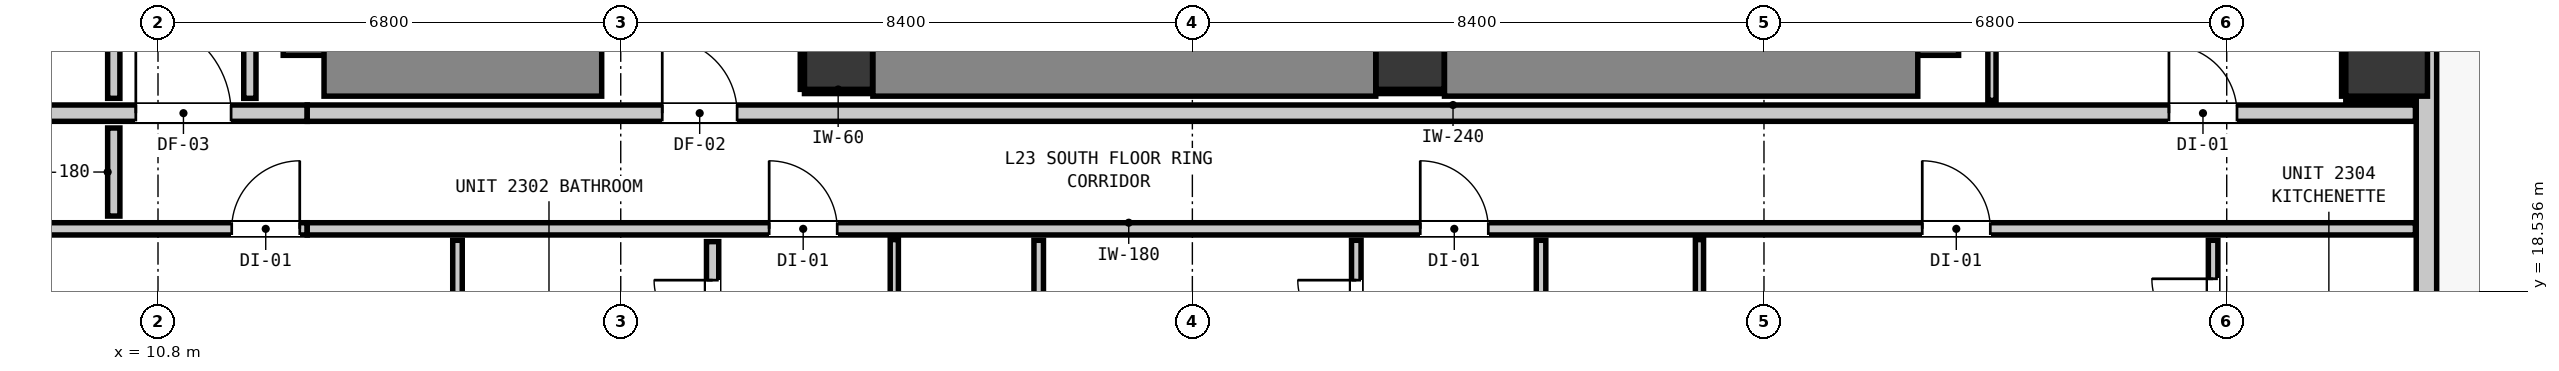
"""IFC4 building model, lengths in metres.
Left out: names, types, materials, properties, quantities, classifications, styles, units other than length and angle.
Written with IfcOpenShell. Run it as: python <this file> out.ifc"""

import sys

from ifc_helpers import new_model, si_unit, direction, frame, frame_2d, origin, origin_2d, place, context, subcontext, project, spatial, rectangle, extrude, element, fill, save


model = new_model("IFC4")
c1 = context("Model", 3, precision=1e-05, world=origin(), true_north=direction((0.0, 1.0)))
c2 = subcontext(c1, "Body", "Model", "MODEL_VIEW")
j1 = project(units=[si_unit("LENGTHUNIT", "METRE"), si_unit("PLANEANGLEUNIT", "RADIAN")], contexts=[c1])
p1 = place(None, origin())
s1 = spatial("IfcSite", under=j1, at=p1, CompositionType="ELEMENT")
p2 = place(p1, origin())
s2 = spatial("IfcBuilding", under=s1, at=p2, CompositionType="ELEMENT")
p3 = place(p2, frame((0.0, 0.0, 81.76)))
s3 = spatial("IfcBuildingStorey", under=s2, at=p3, CompositionType="ELEMENT", Elevation=81.76)
for number, where, z_axis, x_axis in (
    (1, (20.8, 22.0, 0.0), (0.0, 0.0, 1.0), (1.0, 0.0, 0.0)),
    (2, (29.2, 22.0, 0.0), (0.0, 0.0, 1.0), (1.0, 0.0, 0.0)),
):
    element("IfcColumn", number, at=place(p3, frame(where, z_axis=z_axis, x_axis=x_axis)), inside=s3, PredefinedType="COLUMN", context=c2, shape_type="SweptSolid", body=[
        extrude(rectangle(XDim=1.0, YDim=1.0, at=origin_2d()), origin(), (0.0, 0.0, 1.0), 3.32),
    ])
p4 = place(p3, frame((13.24, 22.0, 0.0), z_axis=(0.0, 0.0, 1.0), x_axis=(0.0, 1.0, 0.0)))
e3 = element("IfcWall", 3, at=p4, inside=s3, PredefinedType="SHEAR", context=c2, shape_type="SweptSolid", body=[
    extrude(rectangle(XDim=8.195, YDim=1.2, at=frame_2d((4.098, 0.0))), origin(), (0.0, 0.0, 1.0), 3.32),
])
p5 = place(p3, frame((13.24, 22.0, 0.0), z_axis=(0.0, 0.0, 1.0), x_axis=(1.0, 0.0, 0.0)))
e4 = element("IfcWall", 4, at=p5, inside=s3, PredefinedType="SHEAR", context=c2, shape_type="SweptSolid", body=[
    extrude(rectangle(XDim=4.08, YDim=1.2, at=frame_2d((2.04, 0.0))), origin(), (0.0, 0.0, 1.0), 3.32),
])
p6 = place(p3, frame((36.66, 22.0, 0.0), z_axis=(0.0, 0.0, 1.0), x_axis=(0.0, 1.0, 0.0)))
e5 = element("IfcWall", 5, at=p6, inside=s3, PredefinedType="SHEAR", context=c2, shape_type="SweptSolid", body=[
    extrude(rectangle(XDim=8.195, YDim=1.2, at=frame_2d((4.098, 0.0))), origin(), (0.0, 0.0, 1.0), 3.32),
])
p7 = place(p3, frame((29.705, 22.0, 0.0), z_axis=(0.0, 0.0, 1.0), x_axis=(1.0, 0.0, 0.0)))
e6 = element("IfcWall", 6, at=p7, inside=s3, PredefinedType="SHEAR", context=c2, shape_type="SweptSolid", body=[
    extrude(rectangle(XDim=6.955, YDim=1.2, at=frame_2d((3.478, 0.0))), origin(), (0.0, 0.0, 1.0), 3.32),
])
p8 = place(p3, frame((21.305, 22.0, 0.0), z_axis=(0.0, 0.0, 1.0), x_axis=(1.0, 0.0, 0.0)))
e7 = element("IfcWall", 7, at=p8, inside=s3, PredefinedType="SHEAR", context=c2, shape_type="SweptSolid", body=[
    extrude(rectangle(XDim=7.39, YDim=1.2, at=frame_2d((3.695, 0.0))), origin(), (0.0, 0.0, 1.0), 3.32),
])
p9 = place(p3, frame((43.55, 22.0, -0.2), z_axis=(0.0, 0.0, 1.0), x_axis=(1.0, 0.0, 0.0)))
e8 = element("IfcColumn", 8, at=p9, inside=s3, PredefinedType="COLUMN", context=c2, shape_type="SweptSolid", body=[
    extrude(rectangle(XDim=1.2, YDim=1.2, at=origin_2d()), origin(), (0.0, 0.0, 1.0), 3.52),
])
p10 = place(p3, frame((44.135, 51.035, 0.0), z_axis=(0.0, 0.0, 1.0), x_axis=(0.0, -1.0, 0.0)))
e9 = element("IfcWall", 9, at=p10, inside=s3, PredefinedType="STANDARD", context=c2, shape_type="SweptSolid", body=[
    extrude(rectangle(XDim=34.67, YDim=0.3, at=frame_2d((17.335, 0.0))), origin(), (0.0, 0.0, 1.0), 3.06),
])
p11 = place(p10, frame((0.501, 0.0, 0.0)))
e10 = element("IfcOpeningElement", 10, at=p11, cuts=e9, PredefinedType="OPENING", context=c2, shape_type="SweptSolid", body=[
    extrude(rectangle(XDim=1.1, YDim=2.15, at=frame_2d((0.55, 1.075))), frame((0.0, 0.16, 0.0), z_axis=(0.0, -1.0, 0.0), x_axis=(1.0, 0.0, 0.0)), (0.0, 0.0, 1.0), 0.32),
])
p12 = place(p10, frame((1.978, 0.0, 0.85)))
e11 = element("IfcOpeningElement", 11, at=p12, cuts=e9, PredefinedType="OPENING", context=c2, shape_type="SweptSolid", body=[
    extrude(rectangle(XDim=0.58, YDim=1.5, at=frame_2d((0.29, 0.75))), frame((0.0, 0.16, 0.0), z_axis=(0.0, -1.0, 0.0), x_axis=(1.0, 0.0, 0.0)), (0.0, 0.0, 1.0), 0.32),
])
p13 = place(p10, frame((26.335, 0.0, 0.85)))
e12 = element("IfcOpeningElement", 12, at=p13, cuts=e9, PredefinedType="OPENING", context=c2, shape_type="SweptSolid", body=[
    extrude(rectangle(XDim=1.2, YDim=1.8, at=frame_2d((0.6, 0.9))), frame((0.0, 0.16, 0.0), z_axis=(0.0, -1.0, 0.0), x_axis=(1.0, 0.0, 0.0)), (0.0, 0.0, 1.0), 0.32),
])
p14 = place(p10, frame((13.551, 0.0, 0.85)))
e13 = element("IfcOpeningElement", 13, at=p14, cuts=e9, PredefinedType="OPENING", context=c2, shape_type="SweptSolid", body=[
    extrude(rectangle(XDim=1.2, YDim=1.8, at=frame_2d((0.6, 0.9))), frame((0.0, 0.16, 0.0), z_axis=(0.0, -1.0, 0.0), x_axis=(1.0, 0.0, 0.0)), (0.0, 0.0, 1.0), 0.32),
])
p15 = place(p3, frame((2.657, 21.15, 0.0), z_axis=(0.0, 0.0, 1.0), x_axis=(1.0, 0.0, 0.0)))
e14 = element("IfcWall", 14, at=p15, inside=s3, PredefinedType="PARTITIONING", context=c2, shape_type="SweptSolid", body=[
    extrude(rectangle(XDim=10.336, YDim=0.24, at=frame_2d((5.168, 0.0))), origin(), (0.0, 0.0, 1.0), 2.445),
])
p16 = place(p15, frame((7.817, 0.0, 0.0)))
e15 = element("IfcOpeningElement", 15, at=p16, cuts=e14, PredefinedType="OPENING", context=c2, shape_type="SweptSolid", body=[
    extrude(rectangle(XDim=1.4, YDim=2.15, at=frame_2d((0.7, 1.075))), frame((0.0, 0.13, 0.0), z_axis=(0.0, -1.0, 0.0), x_axis=(1.0, 0.0, 0.0)), (0.0, 0.0, 1.0), 0.26),
])
p17 = place(p3, frame((12.993, 21.15, 0.0), z_axis=(0.0, 0.0, 1.0), x_axis=(1.0, 0.0, 0.0)))
e16 = element("IfcWall", 16, at=p17, inside=s3, PredefinedType="PARTITIONING", context=c2, shape_type="SweptSolid", body=[
    extrude(rectangle(XDim=30.98, YDim=0.24, at=frame_2d((15.49, 0.0))), origin(), (0.0, 0.0, 1.0), 3.06),
])
p18 = place(p17, frame((5.217, 0.0, 0.0)))
e17 = element("IfcOpeningElement", 17, at=p18, cuts=e16, PredefinedType="OPENING", context=c2, shape_type="SweptSolid", body=[
    extrude(rectangle(XDim=1.1, YDim=2.15, at=frame_2d((0.55, 1.075))), frame((0.0, 0.13, 0.0), z_axis=(0.0, -1.0, 0.0), x_axis=(1.0, 0.0, 0.0)), (0.0, 0.0, 1.0), 0.26),
])
p19 = place(p17, frame((27.358, 0.0, 0.0)))
e18 = element("IfcOpeningElement", 18, at=p19, cuts=e16, PredefinedType="OPENING", context=c2, shape_type="SweptSolid", body=[
    extrude(rectangle(XDim=1.0, YDim=2.15, at=frame_2d((0.5, 1.075))), frame((0.0, 0.13, 0.0), z_axis=(0.0, -1.0, 0.0), x_axis=(1.0, 0.0, 0.0)), (0.0, 0.0, 1.0), 0.26),
])
p20 = place(p3, frame((2.657, 19.45, 0.0), z_axis=(0.0, 0.0, 1.0), x_axis=(1.0, 0.0, 0.0)))
e19 = element("IfcWall", 19, at=p20, inside=s3, PredefinedType="PARTITIONING", context=c2, shape_type="SweptSolid", body=[
    extrude(rectangle(XDim=10.336, YDim=0.18, at=frame_2d((5.168, 0.0))), origin(), (0.0, 0.0, 1.0), 2.445),
])
p21 = place(p20, frame((9.226, 0.0, 0.0)))
e20 = element("IfcOpeningElement", 20, at=p21, cuts=e19, PredefinedType="OPENING", context=c2, shape_type="SweptSolid", body=[
    extrude(rectangle(XDim=1.0, YDim=2.15, at=frame_2d((0.5, 1.075))), frame((0.0, 0.1, 0.0), z_axis=(0.0, -1.0, 0.0), x_axis=(1.0, 0.0, 0.0)), (0.0, 0.0, 1.0), 0.2),
])
p22 = place(p3, frame((12.993, 19.45, 0.0), z_axis=(0.0, 0.0, 1.0), x_axis=(1.0, 0.0, 0.0)))
e21 = element("IfcWall", 21, at=p22, inside=s3, PredefinedType="PARTITIONING", context=c2, shape_type="SweptSolid", body=[
    extrude(rectangle(XDim=30.98, YDim=0.18, at=frame_2d((15.49, 0.0))), origin(), (0.0, 0.0, 1.0), 3.06),
])
p23 = place(p22, frame((6.788, 0.0, 0.0)))
e22 = element("IfcOpeningElement", 22, at=p23, cuts=e21, PredefinedType="OPENING", context=c2, shape_type="SweptSolid", body=[
    extrude(rectangle(XDim=1.0, YDim=2.15, at=frame_2d((0.5, 1.075))), frame((0.0, 0.1, 0.0), z_axis=(0.0, -1.0, 0.0), x_axis=(1.0, 0.0, 0.0)), (0.0, 0.0, 1.0), 0.2),
])
p24 = place(p22, frame((16.356, 0.0, 0.0)))
e23 = element("IfcOpeningElement", 23, at=p24, cuts=e21, PredefinedType="OPENING", context=c2, shape_type="SweptSolid", body=[
    extrude(rectangle(XDim=1.0, YDim=2.15, at=frame_2d((0.5, 1.075))), frame((0.0, 0.1, 0.0), z_axis=(0.0, -1.0, 0.0), x_axis=(1.0, 0.0, 0.0)), (0.0, 0.0, 1.0), 0.2),
])
p25 = place(p22, frame((23.733, 0.0, 0.0)))
e24 = element("IfcOpeningElement", 24, at=p25, cuts=e21, PredefinedType="OPENING", context=c2, shape_type="SweptSolid", body=[
    extrude(rectangle(XDim=1.0, YDim=2.15, at=frame_2d((0.5, 1.075))), frame((0.0, 0.1, 0.0), z_axis=(0.0, -1.0, 0.0), x_axis=(1.0, 0.0, 0.0)), (0.0, 0.0, 1.0), 0.2),
])
p26 = place(p3, frame((10.15, 19.638, 0.0), z_axis=(0.0, 0.0, 1.0), x_axis=(0.0, 1.0, 0.0)))
e25 = element("IfcWall", 25, at=p26, inside=s3, PredefinedType="PARTITIONING", context=c2, shape_type="SweptSolid", body=[
    extrude(rectangle(XDim=1.294, YDim=0.18, at=frame_2d((0.647, 0.0))), origin(), (0.0, 0.0, 1.0), 3.06),
])
p27 = place(p3, frame((10.15, 21.368, 0.0), z_axis=(0.0, 0.0, 1.0), x_axis=(0.0, 1.0, 0.0)))
e26 = element("IfcWall", 26, at=p27, inside=s3, PredefinedType="PARTITIONING", context=c2, shape_type="SweptSolid", body=[
    extrude(rectangle(XDim=2.074, YDim=0.18, at=frame_2d((1.037, 0.0))), origin(), (0.0, 0.0, 1.0), 3.06),
])
p28 = place(p3, frame((12.15, 21.368, 0.0), z_axis=(0.0, 0.0, 1.0), x_axis=(0.0, 1.0, 0.0)))
e27 = element("IfcWall", 27, at=p28, inside=s3, PredefinedType="PARTITIONING", context=c2, shape_type="SweptSolid", body=[
    extrude(rectangle(XDim=18.694, YDim=0.18, at=frame_2d((9.347, 0.0))), origin(), (0.0, 0.0, 1.0), 3.06),
])
p29 = place(p3, frame((18.95, 17.275, 0.0), z_axis=(0.0, 0.0, 1.0), x_axis=(0.0, 1.0, 0.0)))
e28 = element("IfcWall", 28, at=p29, inside=s3, PredefinedType="PARTITIONING", context=c2, shape_type="SweptSolid", body=[
    extrude(rectangle(XDim=1.987, YDim=0.18, at=frame_2d((0.994, 0.0))), origin(), (0.0, 0.0, 1.0), 3.06),
])
p30 = place(p29, frame((0.561, 0.0, 0.0)))
e29 = element("IfcOpeningElement", 29, at=p30, cuts=e28, PredefinedType="OPENING", context=c2, shape_type="SweptSolid", body=[
    extrude(rectangle(XDim=0.86, YDim=2.02, at=frame_2d((0.43, 1.01))), frame((0.0, 0.1, 0.0), z_axis=(0.0, -1.0, 0.0), x_axis=(1.0, 0.0, 0.0)), (0.0, 0.0, 1.0), 0.2),
])
for number, where, z_axis, x_axis in (
    (30, (15.201, 17.255, 0.0), (0.0, 0.0, 1.0), (0.0, 1.0, 0.0)),
    (31, (23.742, 17.255, 0.0), (0.0, 0.0, 1.0), (0.0, 1.0, 0.0)),
):
    element("IfcWall", number, at=place(p3, frame(where, z_axis=z_axis, x_axis=x_axis)), inside=s3, PredefinedType="PARTITIONING", context=c2, shape_type="SweptSolid", body=[
        extrude(rectangle(XDim=2.027, YDim=0.14, at=frame_2d((1.014, 0.0))), origin(), (0.0, 0.0, 1.0), 3.06),
    ])
p31 = place(p3, frame((28.409, 17.255, 0.0), z_axis=(0.0, 0.0, 1.0), x_axis=(0.0, 1.0, 0.0)))
e32 = element("IfcWall", 32, at=p31, inside=s3, PredefinedType="PARTITIONING", context=c2, shape_type="SweptSolid", body=[
    extrude(rectangle(XDim=2.027, YDim=0.14, at=frame_2d((1.014, 0.0))), origin(), (0.0, 0.0, 1.0), 3.06),
])
p32 = place(p31, frame((0.581, 0.0, 0.0)))
e33 = element("IfcOpeningElement", 33, at=p32, cuts=e32, PredefinedType="OPENING", context=c2, shape_type="SweptSolid", body=[
    extrude(rectangle(XDim=0.86, YDim=2.02, at=frame_2d((0.43, 1.01))), frame((0.0, 0.08, 0.0), z_axis=(0.0, -1.0, 0.0), x_axis=(1.0, 0.0, 0.0)), (0.0, 0.0, 1.0), 0.16),
])
p33 = place(p3, frame((31.124, 14.027, 0.0), z_axis=(0.0, 0.0, 1.0), x_axis=(0.0, 1.0, 0.0)))
e34 = element("IfcWall", 34, at=p33, inside=s3, PredefinedType="PARTITIONING", context=c2, shape_type="SweptSolid", body=[
    extrude(rectangle(XDim=5.255, YDim=0.14, at=frame_2d((2.627, 0.0))), origin(), (0.0, 0.0, 1.0), 3.06),
])
p34 = place(p33, frame((2.248, 0.0, 0.0)))
e35 = element("IfcOpeningElement", 35, at=p34, cuts=e34, PredefinedType="OPENING", context=c2, shape_type="SweptSolid", body=[
    extrude(rectangle(XDim=0.9, YDim=2.1, at=frame_2d((0.45, 1.05))), frame((0.0, 0.08, 0.0), z_axis=(0.0, -1.0, 0.0), x_axis=(1.0, 0.0, 0.0)), (0.0, 0.0, 1.0), 0.16),
])
p35 = place(p3, frame((41.0, 17.255, 0.0), z_axis=(0.0, 0.0, 1.0), x_axis=(0.0, 1.0, 0.0)))
e36 = element("IfcWall", 36, at=p35, inside=s3, PredefinedType="PARTITIONING", context=c2, shape_type="SweptSolid", body=[
    extrude(rectangle(XDim=2.027, YDim=0.14, at=frame_2d((1.014, 0.0))), origin(), (0.0, 0.0, 1.0), 3.06),
])
p36 = place(p35, frame((0.561, 0.0, 0.0)))
e37 = element("IfcOpeningElement", 37, at=p36, cuts=e36, PredefinedType="OPENING", context=c2, shape_type="SweptSolid", body=[
    extrude(rectangle(XDim=0.9, YDim=2.1, at=frame_2d((0.45, 1.05))), frame((0.0, 0.08, 0.0), z_axis=(0.0, -1.0, 0.0), x_axis=(1.0, 0.0, 0.0)), (0.0, 0.0, 1.0), 0.16),
])
p37 = place(p3, frame((21.62, 14.027, 0.0), z_axis=(0.0, 0.0, 1.0), x_axis=(0.0, 1.0, 0.0)))
e38 = element("IfcWall", 38, at=p37, inside=s3, PredefinedType="PARTITIONING", context=c2, shape_type="SweptSolid", body=[
    extrude(rectangle(XDim=5.265, YDim=0.12, at=frame_2d((2.632, 0.0))), origin(), (0.0, 0.0, 1.0), 3.06),
])
p38 = place(p37, frame((2.248, 0.0, 0.0)))
e39 = element("IfcOpeningElement", 39, at=p38, cuts=e38, PredefinedType="OPENING", context=c2, shape_type="SweptSolid", body=[
    extrude(rectangle(XDim=0.9, YDim=2.1, at=frame_2d((0.45, 1.05))), frame((0.0, 0.07, 0.0), z_axis=(0.0, -1.0, 0.0), x_axis=(1.0, 0.0, 0.0)), (0.0, 0.0, 1.0), 0.14),
])
p39 = place(p3, frame((33.452, 14.027, 0.0), z_axis=(0.0, 0.0, 1.0), x_axis=(0.0, 1.0, 0.0)))
e40 = element("IfcWall", 40, at=p39, inside=s3, PredefinedType="PARTITIONING", context=c2, shape_type="SweptSolid", body=[
    extrude(rectangle(XDim=5.265, YDim=0.12, at=frame_2d((2.632, 0.0))), origin(), (0.0, 0.0, 1.0), 3.06),
])
p40 = place(p3, frame((37.75, 21.338, 0.0), z_axis=(0.0, 0.0, 1.0), x_axis=(0.0, 1.0, 0.0)))
e41 = element("IfcWall", 41, at=p40, inside=s3, PredefinedType="PARTITIONING", context=c2, shape_type="SweptSolid", body=[
    extrude(rectangle(XDim=4.024, YDim=0.12, at=frame_2d((2.012, 0.0))), origin(), (0.0, 0.0, 1.0), 3.06),
])
p41 = place(p3, frame((20.3, 21.468, 0.0), z_axis=(0.0, 0.0, 1.0), x_axis=(1.0, 0.0, 0.0)))
e42 = element("IfcWall", 42, at=p41, inside=s3, PredefinedType="PARTITIONING", context=c2, shape_type="SweptSolid", body=[
    extrude(rectangle(XDim=0.99, YDim=0.06, at=frame_2d((0.495, 0.0))), origin(), (0.0, 0.0, 1.0), 1.45),
])
p42 = place(p3, frame((20.268, 21.5, 0.0), z_axis=(0.0, 0.0, 1.0), x_axis=(0.0, 1.0, 0.0)))
e43 = element("IfcWall", 43, at=p42, inside=s3, PredefinedType="PARTITIONING", context=c2, shape_type="SweptSolid", body=[
    extrude(rectangle(XDim=1.0, YDim=0.06, at=frame_2d((0.5, 0.0))), origin(), (0.0, 0.0, 1.0), 1.45),
])
p43 = place(p3, frame((28.71, 21.468, 0.0), z_axis=(0.0, 0.0, 1.0), x_axis=(1.0, 0.0, 0.0)))
e44 = element("IfcWall", 44, at=p43, inside=s3, PredefinedType="PARTITIONING", context=c2, shape_type="SweptSolid", body=[
    extrude(rectangle(XDim=0.98, YDim=0.06, at=frame_2d((0.49, 0.0))), origin(), (0.0, 0.0, 1.0), 1.45),
])
p44 = place(p3, frame((42.95, 21.368, 0.0), z_axis=(0.0, 0.0, 1.0), x_axis=(1.0, 0.0, 0.0)))
e45 = element("IfcWall", 45, at=p44, inside=s3, PredefinedType="PARTITIONING", context=c2, shape_type="SweptSolid", body=[
    extrude(rectangle(XDim=1.02, YDim=0.06, at=frame_2d((0.51, 0.0))), origin(), (0.0, 0.0, 1.0), 1.45),
])
p45 = place(p3, frame((42.918, 21.4, 0.0), z_axis=(0.0, 0.0, 1.0), x_axis=(0.0, 1.0, 0.0)))
e46 = element("IfcWall", 46, at=p45, inside=s3, PredefinedType="PARTITIONING", context=c2, shape_type="SweptSolid", body=[
    extrude(rectangle(XDim=1.2, YDim=0.06, at=frame_2d((0.6, 0.0))), origin(), (0.0, 0.0, 1.0), 1.45),
])
p46 = place(p18, origin())
e47 = element("IfcDoor", 47, at=p46, inside=s3, OperationType="SINGLE_SWING_LEFT", PredefinedType="DOOR", context=c2, shape_type="SweptSolid", body=[
    extrude(rectangle(XDim=1.1, YDim=2.15, at=frame_2d((0.55, 1.075))), frame((0.0, 0.025, 0.0), z_axis=(0.0, -1.0, 0.0), x_axis=(1.0, 0.0, 0.0)), (0.0, 0.0, 1.0), 0.05),
])
fill(e17, e47)
p47 = place(p16, origin())
e48 = element("IfcDoor", 48, at=p47, inside=s3, OperationType="SINGLE_SWING_LEFT", PredefinedType="DOOR", context=c2, shape_type="SweptSolid", body=[
    extrude(rectangle(XDim=1.4, YDim=2.15, at=frame_2d((0.7, 1.075))), frame((0.0, 0.025, 0.0), z_axis=(0.0, -1.0, 0.0), x_axis=(1.0, 0.0, 0.0)), (0.0, 0.0, 1.0), 0.05),
])
fill(e15, e48)
p48 = place(p21, origin())
e49 = element("IfcDoor", 49, at=p48, inside=s3, OperationType="SINGLE_SWING_RIGHT", PredefinedType="DOOR", context=c2, shape_type="SweptSolid", body=[
    extrude(rectangle(XDim=1.0, YDim=2.15, at=frame_2d((0.5, 1.075))), frame((0.0, 0.025, 0.0), z_axis=(0.0, -1.0, 0.0), x_axis=(1.0, 0.0, 0.0)), (0.0, 0.0, 1.0), 0.05),
])
fill(e20, e49)
p49 = place(p23, origin())
e50 = element("IfcDoor", 50, at=p49, inside=s3, OperationType="SINGLE_SWING_LEFT", PredefinedType="DOOR", context=c2, shape_type="SweptSolid", body=[
    extrude(rectangle(XDim=1.0, YDim=2.15, at=frame_2d((0.5, 1.075))), frame((0.0, 0.025, 0.0), z_axis=(0.0, -1.0, 0.0), x_axis=(1.0, 0.0, 0.0)), (0.0, 0.0, 1.0), 0.05),
])
fill(e22, e50)
p50 = place(p30, origin())
e51 = element("IfcDoor", 51, at=p50, inside=s3, OperationType="SINGLE_SWING_RIGHT", PredefinedType="DOOR", context=c2, shape_type="SweptSolid", body=[
    extrude(rectangle(XDim=0.86, YDim=2.02, at=frame_2d((0.43, 1.01))), frame((0.0, 0.025, 0.0), z_axis=(0.0, -1.0, 0.0), x_axis=(1.0, 0.0, 0.0)), (0.0, 0.0, 1.0), 0.05),
])
fill(e29, e51)
p51 = place(p24, origin())
e52 = element("IfcDoor", 52, at=p51, inside=s3, OperationType="SINGLE_SWING_LEFT", PredefinedType="DOOR", context=c2, shape_type="SweptSolid", body=[
    extrude(rectangle(XDim=1.0, YDim=2.15, at=frame_2d((0.5, 1.075))), frame((0.0, 0.025, 0.0), z_axis=(0.0, -1.0, 0.0), x_axis=(1.0, 0.0, 0.0)), (0.0, 0.0, 1.0), 0.05),
])
fill(e23, e52)
p52 = place(p32, origin())
e53 = element("IfcDoor", 53, at=p52, inside=s3, OperationType="SINGLE_SWING_RIGHT", PredefinedType="DOOR", context=c2, shape_type="SweptSolid", body=[
    extrude(rectangle(XDim=0.86, YDim=2.02, at=frame_2d((0.43, 1.01))), frame((0.0, 0.025, 0.0), z_axis=(0.0, -1.0, 0.0), x_axis=(1.0, 0.0, 0.0)), (0.0, 0.0, 1.0), 0.05),
])
fill(e33, e53)
p53 = place(p25, origin())
e54 = element("IfcDoor", 54, at=p53, inside=s3, OperationType="SINGLE_SWING_LEFT", PredefinedType="DOOR", context=c2, shape_type="SweptSolid", body=[
    extrude(rectangle(XDim=1.0, YDim=2.15, at=frame_2d((0.5, 1.075))), frame((0.0, 0.025, 0.0), z_axis=(0.0, -1.0, 0.0), x_axis=(1.0, 0.0, 0.0)), (0.0, 0.0, 1.0), 0.05),
])
fill(e24, e54)
p54 = place(p36, origin())
e55 = element("IfcDoor", 55, at=p54, inside=s3, OperationType="SINGLE_SWING_RIGHT", PredefinedType="DOOR", context=c2, shape_type="SweptSolid", body=[
    extrude(rectangle(XDim=0.9, YDim=2.1, at=frame_2d((0.45, 1.05))), frame((0.0, 0.025, 0.0), z_axis=(0.0, -1.0, 0.0), x_axis=(1.0, 0.0, 0.0)), (0.0, 0.0, 1.0), 0.05),
])
fill(e37, e55)
p55 = place(p19, origin())
e56 = element("IfcDoor", 56, at=p55, inside=s3, OperationType="SINGLE_SWING_LEFT", PredefinedType="DOOR", context=c2, shape_type="SweptSolid", body=[
    extrude(rectangle(XDim=1.0, YDim=2.15, at=frame_2d((0.5, 1.075))), frame((0.0, 0.025, 0.0), z_axis=(0.0, -1.0, 0.0), x_axis=(1.0, 0.0, 0.0)), (0.0, 0.0, 1.0), 0.05),
])
fill(e18, e56)
save(model, sys.argv[1])
